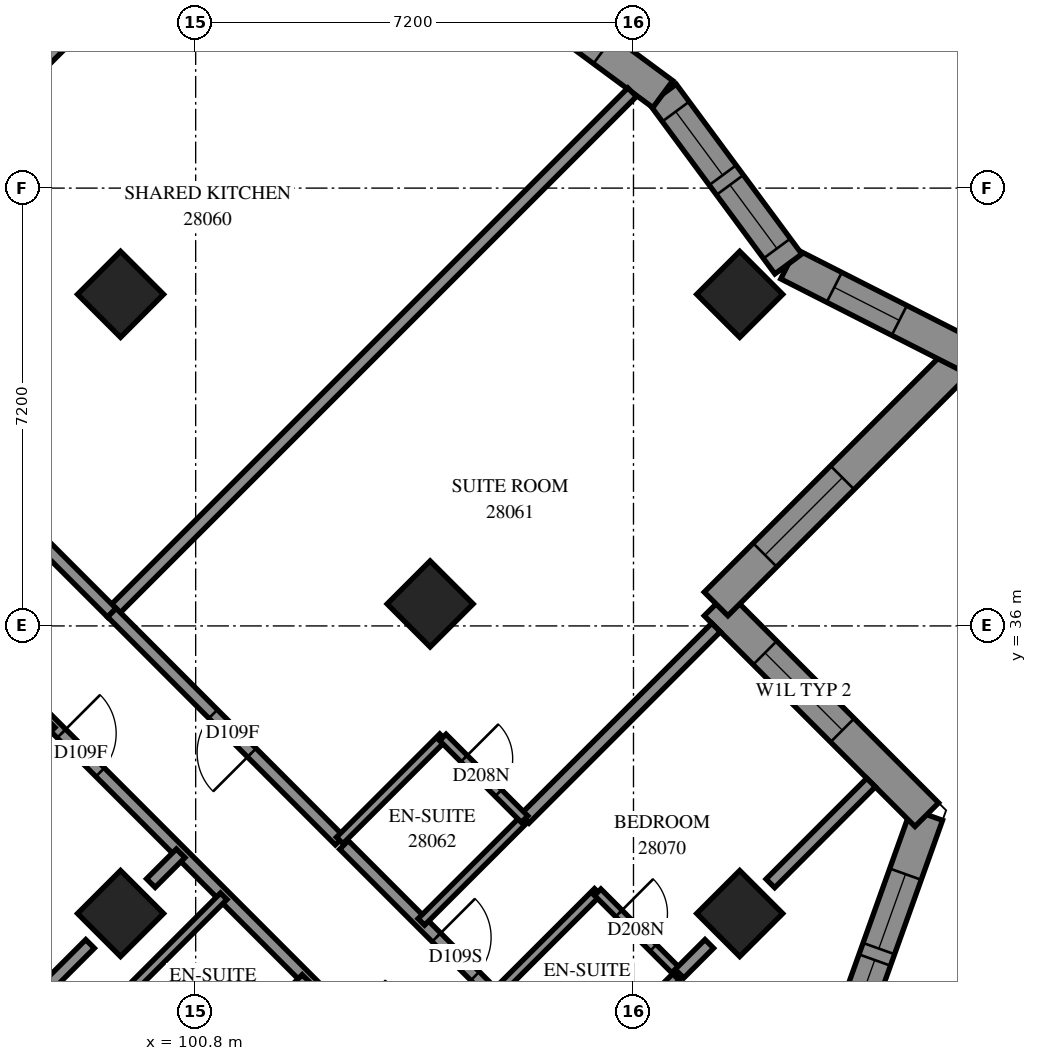
"""IFC4 building model, lengths in metres.
Left out: names, types, materials, properties, quantities, classifications, styles, units other than length and angle.
Written with IfcOpenShell. Run it as: python <this file> out.ifc"""

import sys

from ifc_helpers import new_model, si_unit, direction, frame, frame_2d, origin, origin_2d, place, context, subcontext, project, spatial, polyline, rectangle, outline, extrude, element, fill, save


model = new_model("IFC4")
c1 = context("Model", 3, precision=1e-05, world=origin(), true_north=direction((0.0, 1.0)))
c2 = subcontext(c1, "Body", "Model", "MODEL_VIEW")
j1 = project(units=[si_unit("LENGTHUNIT", "METRE"), si_unit("PLANEANGLEUNIT", "RADIAN")], contexts=[c1])
p1 = place(None, origin())
s1 = spatial("IfcSite", under=j1, at=p1, CompositionType="ELEMENT")
p2 = place(p1, origin())
s2 = spatial("IfcBuilding", under=s1, at=p2, CompositionType="ELEMENT")
p3 = place(p2, frame((0.0, 0.0, 105.0)))
s3 = spatial("IfcBuildingStorey", under=s2, at=p3, CompositionType="ELEMENT", Elevation=105.0)
for number, where, z_axis, x_axis in (
    (1, (99.565, 41.453, 0.0), (0.0, 0.0, 1.0), (0.707, -0.707, 0.0)),
    (2, (109.747, 41.453, 0.0), (0.0, 0.0, 1.0), (0.707, -0.707, 0.0)),
    (3, (104.656, 36.362, 0.0), (0.0, 0.0, 1.0), (0.707, -0.707, 0.0)),
    (4, (99.565, 31.271, 0.0), (0.0, 0.0, 1.0), (0.707, -0.707, 0.0)),
    (5, (109.747, 31.271, 0.0), (0.0, 0.0, 1.0), (0.707, -0.707, 0.0)),
):
    element("IfcColumn", number, at=place(p3, frame(where, z_axis=z_axis, x_axis=x_axis)), inside=s3, PredefinedType="COLUMN", context=c2, shape_type="SweptSolid", body=[
        extrude(rectangle(XDim=1.0, YDim=1.0, at=origin_2d()), origin(), (0.0, 0.0, 1.0), 3.1),
    ])
p4 = place(p3, frame((111.031, 27.89, 0.0), z_axis=(0.0, 0.0, 1.0), x_axis=(0.3371475074, 0.9414518353, 0.0)))
e6 = element("IfcWall", 6, at=p4, inside=s3, PredefinedType="SOLIDWALL", context=c2, shape_type="SweptSolid", body=[
    extrude(outline(polyline([(-0.124, -0.275), (5.492, -0.275), (5.144, 0.275), (0.124, 0.275), (-0.124, -0.275)])), origin(), (0.0, 0.0, 1.0), 3.1),
])
p5 = place(p4, frame((1.479, 0.0, 0.5)))
e7 = element("IfcOpeningElement", 7, at=p5, cuts=e6, PredefinedType="OPENING", context=c2, shape_type="SweptSolid", body=[
    extrude(rectangle(XDim=1.3, YDim=2.45, at=frame_2d((0.65, 1.225))), frame((0.0, 0.285, 0.0), z_axis=(0.0, -1.0, 0.0), x_axis=(1.0, 0.0, 0.0)), (0.0, 0.0, 1.0), 0.57),
])
p6 = place(p4, frame((2.979, 0.0, 0.5)))
e8 = element("IfcOpeningElement", 8, at=p6, cuts=e6, PredefinedType="OPENING", context=c2, shape_type="SweptSolid", body=[
    extrude(rectangle(XDim=1.3, YDim=2.45, at=frame_2d((0.65, 1.225))), frame((0.0, 0.285, 0.0), z_axis=(0.0, -1.0, 0.0), x_axis=(1.0, 0.0, 0.0)), (0.0, 0.0, 1.0), 0.57),
])
p7 = place(p3, frame((112.823, 32.896, 0.0), z_axis=(0.0, 0.0, 1.0), x_axis=(-0.7071067812, 0.7071067812, 0.0)))
e9 = element("IfcWall", 9, at=p7, inside=s3, PredefinedType="SOLIDWALL", context=c2, shape_type="SweptSolid", body=[
    extrude(outline(polyline([(-0.174, -0.275), (4.626, -0.275), (5.176, 0.275), (0.174, 0.275), (-0.174, -0.275)])), origin(), (0.0, 0.0, 1.0), 3.1),
])
p8 = place(p7, frame((1.963, 0.0, 0.6)))
e10 = element("IfcOpeningElement", 10, at=p8, cuts=e9, PredefinedType="OPENING", context=c2, shape_type="SweptSolid", body=[
    extrude(rectangle(XDim=1.8, YDim=1.9, at=frame_2d((0.9, 0.95))), frame((0.0, 0.285, 0.0), z_axis=(0.0, -1.0, 0.0), x_axis=(1.0, 0.0, 0.0)), (0.0, 0.0, 1.0), 0.57),
])
p9 = place(p3, frame((109.358, 36.362, 0.0), z_axis=(0.0, 0.0, 1.0), x_axis=(0.7071067812, 0.7071067812, 0.0)))
e11 = element("IfcWall", 11, at=p9, inside=s3, PredefinedType="SOLIDWALL", context=c2, shape_type="SweptSolid", body=[
    extrude(outline(polyline([(0.275, -0.275), (6.187, -0.275), (5.429, 0.275), (-0.275, 0.275), (0.275, -0.275)])), origin(), (0.0, 0.0, 1.0), 3.1),
])
p10 = place(p9, frame((1.137, 0.0, 0.6)))
e12 = element("IfcOpeningElement", 12, at=p10, cuts=e11, PredefinedType="OPENING", context=c2, shape_type="SweptSolid", body=[
    extrude(rectangle(XDim=1.8, YDim=1.9, at=frame_2d((0.9, 0.95))), frame((0.0, 0.285, 0.0), z_axis=(0.0, -1.0, 0.0), x_axis=(1.0, 0.0, 0.0)), (0.0, 0.0, 1.0), 0.57),
])
p11 = place(p3, frame((113.465, 40.469, 0.0), z_axis=(0.0, 0.0, 1.0), x_axis=(-0.8914386673, 0.4531413715, 0.0)))
e13 = element("IfcWall", 13, at=p11, inside=s3, PredefinedType="SOLIDWALL", context=c2, shape_type="SweptSolid", body=[
    extrude(outline(polyline([(-0.379, -0.275), (3.209, -0.275), (3.339, 0.275), (0.379, 0.275), (-0.379, -0.275)])), origin(), (0.0, 0.0, 1.0), 3.1),
])
p12 = place(p11, frame((1.226, 0.0, 0.5)))
e14 = element("IfcOpeningElement", 14, at=p12, cuts=e13, PredefinedType="OPENING", context=c2, shape_type="SweptSolid", body=[
    extrude(rectangle(XDim=1.2, YDim=2.45, at=frame_2d((0.6, 1.225))), frame((0.0, 0.285, 0.0), z_axis=(0.0, -1.0, 0.0), x_axis=(1.0, 0.0, 0.0)), (0.0, 0.0, 1.0), 0.57),
])
p13 = place(p3, frame((110.546, 41.952, 0.0), z_axis=(0.0, 0.0, 1.0), x_axis=(-0.5942955294, 0.8042467431, 0.0)))
e15 = element("IfcWall", 15, at=p13, inside=s3, PredefinedType="SOLIDWALL", context=c2, shape_type="SweptSolid", body=[
    extrude(outline(polyline([(0.065, -0.275), (3.514, -0.275), (3.432, 0.275), (-0.065, 0.275), (0.065, -0.275)])), origin(), (0.0, 0.0, 1.0), 3.1),
])
p14 = place(p13, frame((0.316, 0.0, 0.5)))
e16 = element("IfcOpeningElement", 16, at=p14, cuts=e15, PredefinedType="OPENING", context=c2, shape_type="SweptSolid", body=[
    extrude(rectangle(XDim=1.3, YDim=2.45, at=frame_2d((0.65, 1.225))), frame((0.0, 0.285, 0.0), z_axis=(0.0, -1.0, 0.0), x_axis=(1.0, 0.0, 0.0)), (0.0, 0.0, 1.0), 0.57),
])
p15 = place(p13, frame((1.816, 0.0, 0.5)))
e17 = element("IfcOpeningElement", 17, at=p15, cuts=e15, PredefinedType="OPENING", context=c2, shape_type="SweptSolid", body=[
    extrude(rectangle(XDim=1.3, YDim=2.45, at=frame_2d((0.65, 1.225))), frame((0.0, 0.285, 0.0), z_axis=(0.0, -1.0, 0.0), x_axis=(1.0, 0.0, 0.0)), (0.0, 0.0, 1.0), 0.57),
])
p16 = place(p3, frame((108.482, 44.746, 0.0), z_axis=(0.0, 0.0, 1.0), x_axis=(-0.8042309632, 0.5943168833, 0.0)))
e18 = element("IfcWall", 18, at=p16, inside=s3, PredefinedType="SOLIDWALL", context=c2, shape_type="SweptSolid", body=[
    extrude(outline(polyline([(-0.041, -0.275), (3.408, -0.275), (3.491, 0.275), (0.041, 0.275), (-0.041, -0.275)])), origin(), (0.0, 0.0, 1.0), 3.1),
])
p17 = place(p16, frame((1.216, 0.0, 0.5)))
e19 = element("IfcOpeningElement", 19, at=p17, cuts=e18, PredefinedType="OPENING", context=c2, shape_type="SweptSolid", body=[
    extrude(rectangle(XDim=1.2, YDim=2.45, at=frame_2d((0.6, 1.225))), frame((0.0, 0.285, 0.0), z_axis=(0.0, -1.0, 0.0), x_axis=(1.0, 0.0, 0.0)), (0.0, 0.0, 1.0), 0.57),
])
p18 = place(p3, frame((92.004, 40.819, 0.0), z_axis=(0.0, 0.0, 1.0), x_axis=(0.7071067812, -0.7071067812, 0.0)))
e20 = element("IfcWall", 20, at=p18, inside=s3, PredefinedType="PARTITIONING", context=c2, shape_type="SweptSolid", body=[
    extrude(rectangle(XDim=19.298, YDim=0.2, at=frame_2d((9.649, 0.0))), origin(), (0.0, 0.0, 1.0), 3.1),
])
p19 = place(p18, frame((3.489, 0.0, 0.0)))
e21 = element("IfcOpeningElement", 21, at=p19, cuts=e20, PredefinedType="OPENING", context=c2, shape_type="SweptSolid", body=[
    extrude(rectangle(XDim=0.9, YDim=2.1, at=frame_2d((0.45, 1.05))), frame((0.0, 0.11, 0.0), z_axis=(0.0, -1.0, 0.0), x_axis=(1.0, 0.0, 0.0)), (0.0, 0.0, 1.0), 0.22),
])
p20 = place(p18, frame((9.319, 0.0, 0.0)))
e22 = element("IfcOpeningElement", 22, at=p20, cuts=e20, PredefinedType="OPENING", context=c2, shape_type="SweptSolid", body=[
    extrude(rectangle(XDim=0.9, YDim=2.1, at=frame_2d((0.45, 1.05))), frame((0.0, 0.11, 0.0), z_axis=(0.0, -1.0, 0.0), x_axis=(1.0, 0.0, 0.0)), (0.0, 0.0, 1.0), 0.22),
])
p21 = place(p18, frame((15.961, 0.0, 0.0)))
e23 = element("IfcOpeningElement", 23, at=p21, cuts=e20, PredefinedType="OPENING", context=c2, shape_type="SweptSolid", body=[
    extrude(rectangle(XDim=0.9, YDim=2.1, at=frame_2d((0.45, 1.05))), frame((0.0, 0.11, 0.0), z_axis=(0.0, -1.0, 0.0), x_axis=(1.0, 0.0, 0.0)), (0.0, 0.0, 1.0), 0.22),
])
p22 = place(p3, frame((99.423, 36.221, 0.0), z_axis=(0.0, 0.0, 1.0), x_axis=(0.7071067812, 0.7071067812, 0.0)))
e24 = element("IfcWall", 24, at=p22, inside=s3, PredefinedType="PARTITIONING", context=c2, shape_type="SweptSolid", body=[
    extrude(rectangle(XDim=12.099, YDim=0.2, at=frame_2d((6.049, 0.0))), origin(), (0.0, 0.0, 1.0), 3.1),
])
p23 = place(p3, frame((94.331, 41.313, 0.0), z_axis=(0.0, 0.0, 1.0), x_axis=(0.7071109333, 0.7071026291, 0.0)))
e25 = element("IfcWall", 25, at=p23, inside=s3, PredefinedType="PARTITIONING", context=c2, shape_type="SweptSolid", body=[
    extrude(rectangle(XDim=12.042, YDim=0.2, at=frame_2d((6.021, 0.0))), origin(), (0.0, 0.0, 1.0), 3.1),
])
p24 = place(p3, frame((93.413, 42.233, 0.0), z_axis=(0.0, 0.0, 1.0), x_axis=(0.7071067812, 0.7071067812, 0.0)))
e26 = element("IfcWall", 26, at=p24, inside=s3, PredefinedType="PARTITIONING", context=c2, shape_type="SweptSolid", body=[
    extrude(rectangle(XDim=9.699, YDim=0.2, at=frame_2d((4.849, 0.0))), origin(), (0.0, 0.0, 1.0), 3.1),
])
p25 = place(p24, frame((0.249, 0.0, 0.0)))
e27 = element("IfcOpeningElement", 27, at=p25, cuts=e26, PredefinedType="OPENING", context=c2, shape_type="SweptSolid", body=[
    extrude(rectangle(XDim=1.0, YDim=2.1, at=frame_2d((0.5, 1.05))), frame((0.0, 0.11, 0.0), z_axis=(0.0, -1.0, 0.0), x_axis=(1.0, 0.0, 0.0)), (0.0, 0.0, 1.0), 0.22),
])
p26 = place(p3, frame((93.411, 42.227, 0.0), z_axis=(0.0, 0.0, 1.0), x_axis=(0.7071067812, -0.7071067812, 0.0)))
e28 = element("IfcWall", 28, at=p26, inside=s3, PredefinedType="PARTITIONING", context=c2, shape_type="SweptSolid", body=[
    extrude(rectangle(XDim=8.499, YDim=0.2, at=frame_2d((4.25, 0.0))), origin(), (0.0, 0.0, 1.0), 3.1),
])
p27 = place(p26, frame((3.672, 0.0, 0.0)))
e29 = element("IfcOpeningElement", 29, at=p27, cuts=e28, PredefinedType="OPENING", context=c2, shape_type="SweptSolid", body=[
    extrude(rectangle(XDim=1.0, YDim=2.1, at=frame_2d((0.5, 1.05))), frame((0.0, 0.11, 0.0), z_axis=(0.0, -1.0, 0.0), x_axis=(1.0, 0.0, 0.0)), (0.0, 0.0, 1.0), 0.22),
])
p28 = place(p3, frame((94.973, 26.681, 0.0), z_axis=(0.0, 0.0, 1.0), x_axis=(0.7071067812, 0.7071067812, 0.0)))
e30 = element("IfcWall", 30, at=p28, inside=s3, PredefinedType="PARTITIONING", context=c2, shape_type="SweptSolid", body=[
    extrude(rectangle(XDim=5.784, YDim=0.2, at=frame_2d((2.892, 0.0))), origin(), (0.0, 0.0, 1.0), 3.1),
])
p29 = place(p3, frame((103.239, 32.399, 0.0), z_axis=(0.0, 0.0, 1.0), x_axis=(0.7071067812, -0.7071067812, 0.0)))
e31 = element("IfcWall", 31, at=p29, inside=s3, PredefinedType="PARTITIONING", context=c2, shape_type="SweptSolid", body=[
    extrude(rectangle(XDim=5.399, YDim=0.2, at=frame_2d((2.7, 0.0))), origin(), (0.0, 0.0, 1.0), 3.1),
])
p30 = place(p29, frame((2.15, 0.0, 0.0)))
e32 = element("IfcOpeningElement", 32, at=p30, cuts=e31, PredefinedType="OPENING", context=c2, shape_type="SweptSolid", body=[
    extrude(rectangle(XDim=0.9, YDim=2.1, at=frame_2d((0.45, 1.05))), frame((0.0, 0.11, 0.0), z_axis=(0.0, -1.0, 0.0), x_axis=(1.0, 0.0, 0.0)), (0.0, 0.0, 1.0), 0.22),
])
p31 = place(p3, frame((103.168, 32.47, 0.0), z_axis=(0.0, 0.0, 1.0), x_axis=(-0.7067858967, 0.7074275201, 0.0)))
e33 = element("IfcWall", 33, at=p31, inside=s3, PredefinedType="PARTITIONING", context=c2, shape_type="SweptSolid", body=[
    extrude(rectangle(XDim=5.299, YDim=0.2, at=frame_2d((2.65, 0.0))), origin(), (0.0, 0.0, 1.0), 3.1),
])
p32 = place(p31, frame((2.043, 0.0, 0.0)))
e34 = element("IfcOpeningElement", 34, at=p32, cuts=e33, PredefinedType="OPENING", context=c2, shape_type="SweptSolid", body=[
    extrude(rectangle(XDim=0.9, YDim=2.1, at=frame_2d((0.45, 1.05))), frame((0.0, 0.11, 0.0), z_axis=(0.0, -1.0, 0.0), x_axis=(1.0, 0.0, 0.0)), (0.0, 0.0, 1.0), 0.22),
])
p33 = place(p3, frame((106.211, 32.827, 0.0), z_axis=(0.0, 0.0, 1.0), x_axis=(0.7071067812, 0.7071067812, 0.0)))
e35 = element("IfcWall", 35, at=p33, inside=s3, PredefinedType="PARTITIONING", context=c2, shape_type="SweptSolid", body=[
    extrude(rectangle(XDim=4.45, YDim=0.2, at=frame_2d((2.225, 0.0))), origin(), (0.0, 0.0, 1.0), 3.1),
])
for number, where, z_axis, x_axis in (
    (36, (96.735, 32.685, 0.0), (0.0, 0.0, 1.0), (0.707, 0.707, 0.0)),
    (37, (103.169, 32.473, 0.0), (0.0, 0.0, 1.0), (0.707, 0.707, 0.0)),
    (38, (99.563, 29.857, 0.0), (0.0, 0.0, 1.0), (0.707, 0.707, 0.0)),
    (39, (100.907, 28.513, 0.0), (0.0, 0.0, 1.0), (0.707, 0.707, 0.0)),
):
    element("IfcWall", number, at=place(p3, frame(where, z_axis=z_axis, x_axis=x_axis)), inside=s3, PredefinedType="PARTITIONING", context=c2, shape_type="SweptSolid", body=[
        extrude(rectangle(XDim=2.401, YDim=0.15, at=frame_2d((1.201, 0.0))), origin(), (0.0, 0.0, 1.0), 3.1),
    ])
for number, where, z_axis, x_axis in (
    (40, (104.511, 31.133, 0.0), (0.0, 0.0, 1.0), (0.708, 0.707, 0.0)),
    (41, (105.713, 29.931, 0.0), (0.0, 0.0, 1.0), (0.708, 0.707, 0.0)),
):
    element("IfcWall", number, at=place(p3, frame(where, z_axis=z_axis, x_axis=x_axis)), inside=s3, PredefinedType="PARTITIONING", context=c2, shape_type="SweptSolid", body=[
        extrude(rectangle(XDim=2.4, YDim=0.15, at=frame_2d((1.2, 0.0))), origin(), (0.0, 0.0, 1.0), 3.1),
    ])
p34 = place(p3, frame((107.057, 28.587, 0.0), z_axis=(0.0, 0.0, 1.0), x_axis=(0.7075233388, 0.706689978, 0.0)))
e42 = element("IfcWall", 42, at=p34, inside=s3, PredefinedType="PARTITIONING", context=c2, shape_type="SweptSolid", body=[
    extrude(rectangle(XDim=2.4, YDim=0.15, at=frame_2d((1.2, 0.0))), origin(), (0.0, 0.0, 1.0), 2.6),
])
p35 = place(p3, frame((110.251, 31.767, 0.0), z_axis=(0.0, 0.0, 1.0), x_axis=(0.7066584143, 0.7075548639, 0.0)))
e43 = element("IfcWall", 43, at=p35, inside=s3, PredefinedType="PARTITIONING", context=c2, shape_type="SweptSolid", body=[
    extrude(rectangle(XDim=2.343, YDim=0.2, at=frame_2d((1.171, 0.0))), origin(), (0.0, 0.0, 1.0), 3.1),
])
p36 = place(p3, frame((107.411, 31.621, 0.0), z_axis=(0.0, 0.0, 1.0), x_axis=(0.7071067812, -0.7071067812, 0.0)))
e44 = element("IfcWall", 44, at=p36, inside=s3, PredefinedType="PARTITIONING", context=c2, shape_type="SweptSolid", body=[
    extrude(rectangle(XDim=1.901, YDim=0.15, at=frame_2d((0.95, 0.0))), origin(), (0.0, 0.0, 1.0), 3.1),
])
p37 = place(p36, frame((0.493, 0.0, 0.0)))
e45 = element("IfcOpeningElement", 45, at=p37, cuts=e44, PredefinedType="OPENING", context=c2, shape_type="SweptSolid", body=[
    extrude(rectangle(XDim=0.8, YDim=2.1, at=frame_2d((0.4, 1.05))), frame((0.0, 0.085, 0.0), z_axis=(0.0, -1.0, 0.0), x_axis=(1.0, 0.0, 0.0)), (0.0, 0.0, 1.0), 0.17),
])
p38 = place(p3, frame((104.865, 34.167, 0.0), z_axis=(0.0, 0.0, 1.0), x_axis=(0.7071067812, -0.7071067812, 0.0)))
e46 = element("IfcWall", 46, at=p38, inside=s3, PredefinedType="PARTITIONING", context=c2, shape_type="SweptSolid", body=[
    extrude(rectangle(XDim=1.901, YDim=0.15, at=frame_2d((0.95, 0.0))), origin(), (0.0, 0.0, 1.0), 3.1),
])
p39 = place(p38, frame((0.493, 0.0, 0.0)))
e47 = element("IfcOpeningElement", 47, at=p39, cuts=e46, PredefinedType="OPENING", context=c2, shape_type="SweptSolid", body=[
    extrude(rectangle(XDim=0.8, YDim=2.1, at=frame_2d((0.4, 1.05))), frame((0.0, 0.085, 0.0), z_axis=(0.0, -1.0, 0.0), x_axis=(1.0, 0.0, 0.0)), (0.0, 0.0, 1.0), 0.17),
])
p40 = place(p3, frame((108.756, 30.282, 0.0), z_axis=(0.0, 0.0, 1.0), x_axis=(0.7071067812, 0.7071067812, 0.0)))
e48 = element("IfcWall", 48, at=p40, inside=s3, PredefinedType="PARTITIONING", context=c2, shape_type="SweptSolid", body=[
    extrude(rectangle(XDim=0.693, YDim=0.2, at=frame_2d((0.346, 0.0))), origin(), (0.0, 0.0, 1.0), 2.6),
])
p41 = place(p3, frame((100.063, 31.771, 0.0), z_axis=(0.0, 0.0, 1.0), x_axis=(0.7071067812, 0.7071067812, 0.0)))
e49 = element("IfcWall", 49, at=p41, inside=s3, PredefinedType="PARTITIONING", context=c2, shape_type="SweptSolid", body=[
    extrude(rectangle(XDim=0.693, YDim=0.2, at=frame_2d((0.346, 0.0))), origin(), (0.0, 0.0, 1.0), 3.1),
])
p42 = place(p5, origin())
e50 = element("IfcWindow", 50, at=p42, inside=s3, PartitioningType="SINGLE_PANEL", PredefinedType="WINDOW", context=c2, shape_type="SweptSolid", body=[
    extrude(rectangle(XDim=1.3, YDim=2.45, at=frame_2d((0.65, 1.225))), frame((0.0, 0.155, 0.0), z_axis=(0.0, -1.0, 0.0), x_axis=(1.0, 0.0, 0.0)), (0.0, 0.0, 1.0), 0.06),
])
fill(e7, e50)
p43 = place(p6, origin())
e51 = element("IfcWindow", 51, at=p43, inside=s3, PartitioningType="SINGLE_PANEL", PredefinedType="WINDOW", context=c2, shape_type="SweptSolid", body=[
    extrude(rectangle(XDim=1.3, YDim=2.45, at=frame_2d((0.65, 1.225))), frame((0.0, 0.155, 0.0), z_axis=(0.0, -1.0, 0.0), x_axis=(1.0, 0.0, 0.0)), (0.0, 0.0, 1.0), 0.06),
])
fill(e8, e51)
p44 = place(p8, origin())
e52 = element("IfcWindow", 52, at=p44, inside=s3, PartitioningType="SINGLE_PANEL", PredefinedType="WINDOW", context=c2, shape_type="SweptSolid", body=[
    extrude(rectangle(XDim=1.8, YDim=1.9, at=frame_2d((0.9, 0.95))), frame((0.0, 0.155, 0.0), z_axis=(0.0, -1.0, 0.0), x_axis=(1.0, 0.0, 0.0)), (0.0, 0.0, 1.0), 0.06),
])
fill(e10, e52)
p45 = place(p10, origin())
e53 = element("IfcWindow", 53, at=p45, inside=s3, PartitioningType="SINGLE_PANEL", PredefinedType="WINDOW", context=c2, shape_type="SweptSolid", body=[
    extrude(rectangle(XDim=1.8, YDim=1.9, at=frame_2d((0.9, 0.95))), frame((0.0, 0.155, 0.0), z_axis=(0.0, -1.0, 0.0), x_axis=(1.0, 0.0, 0.0)), (0.0, 0.0, 1.0), 0.06),
])
fill(e12, e53)
p46 = place(p12, origin())
e54 = element("IfcWindow", 54, at=p46, inside=s3, PartitioningType="SINGLE_PANEL", PredefinedType="WINDOW", context=c2, shape_type="SweptSolid", body=[
    extrude(rectangle(XDim=1.2, YDim=2.45, at=frame_2d((0.6, 1.225))), frame((0.0, 0.155, 0.0), z_axis=(0.0, -1.0, 0.0), x_axis=(1.0, 0.0, 0.0)), (0.0, 0.0, 1.0), 0.06),
])
fill(e14, e54)
p47 = place(p14, origin())
e55 = element("IfcWindow", 55, at=p47, inside=s3, PartitioningType="SINGLE_PANEL", PredefinedType="WINDOW", context=c2, shape_type="SweptSolid", body=[
    extrude(rectangle(XDim=1.3, YDim=2.45, at=frame_2d((0.65, 1.225))), frame((0.0, 0.155, 0.0), z_axis=(0.0, -1.0, 0.0), x_axis=(1.0, 0.0, 0.0)), (0.0, 0.0, 1.0), 0.06),
])
fill(e16, e55)
p48 = place(p15, origin())
e56 = element("IfcWindow", 56, at=p48, inside=s3, PartitioningType="SINGLE_PANEL", PredefinedType="WINDOW", context=c2, shape_type="SweptSolid", body=[
    extrude(rectangle(XDim=1.3, YDim=2.45, at=frame_2d((0.65, 1.225))), frame((0.0, 0.155, 0.0), z_axis=(0.0, -1.0, 0.0), x_axis=(1.0, 0.0, 0.0)), (0.0, 0.0, 1.0), 0.06),
])
fill(e17, e56)
p49 = place(p17, origin())
e57 = element("IfcWindow", 57, at=p49, inside=s3, PartitioningType="SINGLE_PANEL", PredefinedType="WINDOW", context=c2, shape_type="SweptSolid", body=[
    extrude(rectangle(XDim=1.2, YDim=2.45, at=frame_2d((0.6, 1.225))), frame((0.0, 0.155, 0.0), z_axis=(0.0, -1.0, 0.0), x_axis=(1.0, 0.0, 0.0)), (0.0, 0.0, 1.0), 0.06),
])
fill(e19, e57)
p50 = place(p32, origin())
e58 = element("IfcDoor", 58, at=p50, inside=s3, OperationType="SINGLE_SWING_RIGHT", PredefinedType="DOOR", context=c2, shape_type="SweptSolid", body=[
    extrude(rectangle(XDim=0.9, YDim=2.1, at=frame_2d((0.45, 1.05))), frame((0.0, 0.025, 0.0), z_axis=(0.0, -1.0, 0.0), x_axis=(1.0, 0.0, 0.0)), (0.0, 0.0, 1.0), 0.05),
])
fill(e34, e58)
p51 = place(p39, origin())
e59 = element("IfcDoor", 59, at=p51, inside=s3, OperationType="SINGLE_SWING_RIGHT", PredefinedType="DOOR", context=c2, shape_type="SweptSolid", body=[
    extrude(rectangle(XDim=0.8, YDim=2.1, at=frame_2d((0.4, 1.05))), frame((0.0, 0.025, 0.0), z_axis=(0.0, -1.0, 0.0), x_axis=(1.0, 0.0, 0.0)), (0.0, 0.0, 1.0), 0.05),
])
fill(e47, e59)
p52 = place(p20, origin())
e60 = element("IfcDoor", 60, at=p52, inside=s3, OperationType="SINGLE_SWING_RIGHT", PredefinedType="DOOR", context=c2, shape_type="SweptSolid", body=[
    extrude(rectangle(XDim=0.9, YDim=2.1, at=frame_2d((0.45, 1.05))), frame((0.0, 0.025, 0.0), z_axis=(0.0, -1.0, 0.0), x_axis=(1.0, 0.0, 0.0)), (0.0, 0.0, 1.0), 0.05),
])
fill(e22, e60)
p53 = place(p30, origin())
e61 = element("IfcDoor", 61, at=p53, inside=s3, OperationType="SINGLE_SWING_RIGHT", PredefinedType="DOOR", context=c2, shape_type="SweptSolid", body=[
    extrude(rectangle(XDim=0.9, YDim=2.1, at=frame_2d((0.45, 1.05))), frame((0.0, 0.025, 0.0), z_axis=(0.0, -1.0, 0.0), x_axis=(1.0, 0.0, 0.0)), (0.0, 0.0, 1.0), 0.05),
])
fill(e32, e61)
p54 = place(p37, origin())
e62 = element("IfcDoor", 62, at=p54, inside=s3, OperationType="SINGLE_SWING_RIGHT", PredefinedType="DOOR", context=c2, shape_type="SweptSolid", body=[
    extrude(rectangle(XDim=0.8, YDim=2.1, at=frame_2d((0.4, 1.05))), frame((0.0, 0.025, 0.0), z_axis=(0.0, -1.0, 0.0), x_axis=(1.0, 0.0, 0.0)), (0.0, 0.0, 1.0), 0.05),
])
fill(e45, e62)
save(model, sys.argv[1])
